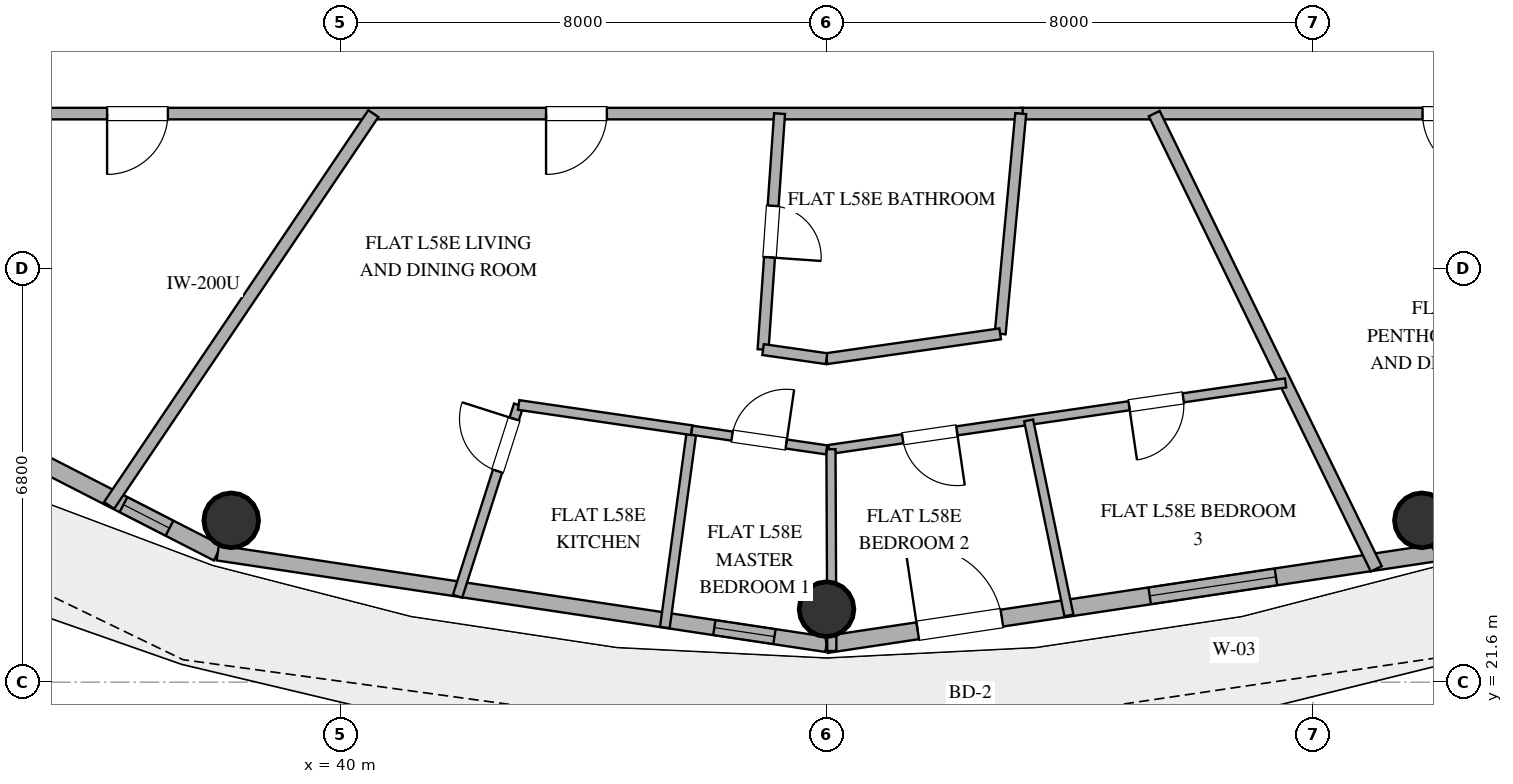
"""IFC4 building model, lengths in metres.
Left out: names, types, materials, properties, quantities, classifications, styles, units other than length and angle.
Written with IfcOpenShell. Run it as: python <this file> out.ifc"""

import sys

from ifc_helpers import new_model, si_unit, direction, frame, frame_2d, origin, origin_2d, place, context, subcontext, project, spatial, rectangle, hollow_circle, extrude, element, fill, save


model = new_model("IFC4")
c1 = context("Model", 3, precision=1e-05, world=origin(), true_north=direction((0.0, 1.0)))
c2 = subcontext(c1, "Body", "Model", "MODEL_VIEW")
j1 = project(units=[si_unit("LENGTHUNIT", "METRE"), si_unit("PLANEANGLEUNIT", "RADIAN")], contexts=[c1])
p1 = place(None, origin())
s1 = spatial("IfcSite", under=j1, at=p1, CompositionType="ELEMENT")
p2 = place(p1, origin())
s2 = spatial("IfcBuilding", under=s1, at=p2, CompositionType="ELEMENT")
p3 = place(p2, frame((0.0, 0.0, 228.0)))
s3 = spatial("IfcBuildingStorey", under=s2, at=p3, CompositionType="ELEMENT", Elevation=228.0)
for number, where, z_axis, x_axis in (
    (1, (38.209, 24.261, 0.0), (0.0, 0.0, 1.0), (1.0, 0.0, 0.0)),
    (2, (48.0, 22.8, 0.0), (0.0, 0.0, 1.0), (1.0, 0.0, 0.0)),
    (3, (57.791, 24.261, 0.0), (0.0, 0.0, 1.0), (1.0, 0.0, 0.0)),
):
    element("IfcColumn", number, at=place(p3, frame(where, z_axis=z_axis, x_axis=x_axis)), inside=s3, PredefinedType="COLUMN", context=c2, shape_type="SweptSolid", body=[
        extrude(hollow_circle(Radius=0.45, WallThickness=0.025, at=origin_2d()), origin(), (0.0, 0.0, 1.0), 3.36),
    ])
p4 = place(p3, frame((29.617, 28.013, 0.0), z_axis=(0.0, 0.0, 1.0), x_axis=(0.890007394051, -0.455946091699, 0.0)))
e4 = element("IfcWall", 4, at=p4, inside=s3, PredefinedType="SOLIDWALL", context=c2, shape_type="SweptSolid", body=[
    extrude(rectangle(XDim=9.404, YDim=0.28, at=frame_2d((4.702, 0.0))), origin(), (0.0, 0.0, 1.0), 3.36),
])
p5 = place(p4, frame((2.553, 0.0, 0.85)))
e5 = element("IfcOpeningElement", 5, at=p5, cuts=e4, PredefinedType="OPENING", context=c2, shape_type="SweptSolid", body=[
    extrude(rectangle(XDim=1.35, YDim=1.8, at=frame_2d((0.675, 0.9))), frame((0.0, 0.15, 0.0), z_axis=(0.0, -1.0, 0.0), x_axis=(1.0, 0.0, 0.0)), (0.0, 0.0, 1.0), 0.3),
])
p6 = place(p4, frame((4.88, 0.0, 0.85)))
e6 = element("IfcOpeningElement", 6, at=p6, cuts=e4, PredefinedType="OPENING", context=c2, shape_type="SweptSolid", body=[
    extrude(rectangle(XDim=1.35, YDim=1.8, at=frame_2d((0.675, 0.9))), frame((0.0, 0.15, 0.0), z_axis=(0.0, -1.0, 0.0), x_axis=(1.0, 0.0, 0.0)), (0.0, 0.0, 1.0), 0.3),
])
p7 = place(p4, frame((7.663, 0.0, 0.85)))
e7 = element("IfcOpeningElement", 7, at=p7, cuts=e4, PredefinedType="OPENING", context=c2, shape_type="SweptSolid", body=[
    extrude(rectangle(XDim=0.85, YDim=1.8, at=frame_2d((0.425, 0.9))), frame((0.0, 0.15, 0.0), z_axis=(0.0, -1.0, 0.0), x_axis=(1.0, 0.0, 0.0)), (0.0, 0.0, 1.0), 0.3),
])
p8 = place(p3, frame((37.987, 23.726, 0.0), z_axis=(0.0, 0.0, 1.0), x_axis=(0.988882522213, -0.148698881169, 0.0)))
e8 = element("IfcWall", 8, at=p8, inside=s3, PredefinedType="SOLIDWALL", context=c2, shape_type="SweptSolid", body=[
    extrude(rectangle(XDim=10.125, YDim=0.25, at=frame_2d((5.062, 0.0))), origin(), (0.0, 0.0, 1.0), 3.36),
])
p9 = place(p8, frame((8.259, 0.0, 0.35)))
e9 = element("IfcOpeningElement", 9, at=p9, cuts=e8, PredefinedType="OPENING", context=c2, shape_type="SweptSolid", body=[
    extrude(rectangle(XDim=1.0, YDim=1.05, at=frame_2d((0.5, 0.525))), frame((0.0, 0.135, 0.0), z_axis=(0.0, -1.0, 0.0), x_axis=(1.0, 0.0, 0.0)), (0.0, 0.0, 1.0), 0.27),
])
p10 = place(p3, frame((48.0, 22.22, 0.0), z_axis=(0.0, 0.0, 1.0), x_axis=(0.988882522213, 0.148698881169, 0.0)))
e10 = element("IfcWall", 10, at=p10, inside=s3, PredefinedType="SOLIDWALL", context=c2, shape_type="SweptSolid", body=[
    extrude(rectangle(XDim=10.125, YDim=0.28, at=frame_2d((5.062, 0.0))), origin(), (0.0, 0.0, 1.0), 3.36),
])
p11 = place(p10, frame((1.516, 0.0, 0.0)))
e11 = element("IfcOpeningElement", 11, at=p11, cuts=e10, PredefinedType="OPENING", context=c2, shape_type="SweptSolid", body=[
    extrude(rectangle(XDim=1.4, YDim=2.2, at=frame_2d((0.7, 1.1))), frame((0.0, 0.15, 0.0), z_axis=(0.0, -1.0, 0.0), x_axis=(1.0, 0.0, 0.0)), (0.0, 0.0, 1.0), 0.3),
])
p12 = place(p10, frame((5.374, 0.0, 0.85)))
e12 = element("IfcOpeningElement", 12, at=p12, cuts=e10, PredefinedType="OPENING", context=c2, shape_type="SweptSolid", body=[
    extrude(rectangle(XDim=2.1, YDim=2.2, at=frame_2d((1.05, 1.1))), frame((0.0, 0.15, 0.0), z_axis=(0.0, -1.0, 0.0), x_axis=(1.0, 0.0, 0.0)), (0.0, 0.0, 1.0), 0.3),
])
p13 = place(p3, frame((63.25, 30.95, 0.0), z_axis=(0.0, 0.0, 1.0), x_axis=(-1.0, 0.0, 0.0)))
e13 = element("IfcWall", 13, at=p13, inside=s3, PredefinedType="PARTITIONING", context=c2, shape_type="SweptSolid", body=[
    extrude(rectangle(XDim=12.056, YDim=0.19, at=frame_2d((6.028, 0.0))), origin(), (0.0, 0.0, 1.0), 2.72),
])
p14 = place(p13, frame((4.448, 0.0, 0.0)))
e14 = element("IfcOpeningElement", 14, at=p14, cuts=e13, PredefinedType="OPENING", context=c2, shape_type="SweptSolid", body=[
    extrude(rectangle(XDim=1.0, YDim=2.2, at=frame_2d((0.5, 1.1))), frame((0.0, 0.105, 0.0), z_axis=(0.0, -1.0, 0.0), x_axis=(1.0, 0.0, 0.0)), (0.0, 0.0, 1.0), 0.21),
])
p15 = place(p3, frame((51.226, 30.95, 0.0), z_axis=(0.0, 0.0, 1.0), x_axis=(-1.0, 0.0, 0.0)))
e15 = element("IfcWall", 15, at=p15, inside=s3, PredefinedType="PARTITIONING", context=c2, shape_type="SweptSolid", body=[
    extrude(rectangle(XDim=18.476, YDim=0.19, at=frame_2d((9.238, 0.0))), origin(), (0.0, 0.0, 1.0), 2.72),
])
p16 = place(p15, frame((14.058, 0.0, 0.0)))
e16 = element("IfcOpeningElement", 16, at=p16, cuts=e15, PredefinedType="OPENING", context=c2, shape_type="SweptSolid", body=[
    extrude(rectangle(XDim=1.0, YDim=2.2, at=frame_2d((0.5, 1.1))), frame((0.0, 0.105, 0.0), z_axis=(0.0, -1.0, 0.0), x_axis=(1.0, 0.0, 0.0)), (0.0, 0.0, 1.0), 0.21),
])
p17 = place(p15, frame((6.839, 0.0, 0.0)))
e17 = element("IfcOpeningElement", 17, at=p17, cuts=e15, PredefinedType="OPENING", context=c2, shape_type="SweptSolid", body=[
    extrude(rectangle(XDim=1.0, YDim=2.2, at=frame_2d((0.5, 1.1))), frame((0.0, 0.105, 0.0), z_axis=(0.0, -1.0, 0.0), x_axis=(1.0, 0.0, 0.0)), (0.0, 0.0, 1.0), 0.21),
])
p18 = place(p3, frame((36.201, 24.507, 0.0), z_axis=(0.0, 0.0, 1.0), x_axis=(0.559208454265, 0.8290270832, 0.0)))
e18 = element("IfcWall", 18, at=p18, inside=s3, PredefinedType="PARTITIONING", context=c2, shape_type="SweptSolid", body=[
    extrude(rectangle(XDim=7.771, YDim=0.2, at=frame_2d((3.886, 0.0))), origin(), (0.0, 0.0, 1.0), 2.72),
])
p19 = place(p3, frame((53.389, 30.95, 0.0), z_axis=(0.0, 0.0, 1.0), x_axis=(0.438386671508, -0.898786474222, 0.0)))
e19 = element("IfcWall", 19, at=p19, inside=s3, PredefinedType="PARTITIONING", context=c2, shape_type="SweptSolid", body=[
    extrude(rectangle(XDim=8.329, YDim=0.2, at=frame_2d((4.165, 0.0))), origin(), (0.0, 0.0, 1.0), 2.72),
])
p20 = place(p3, frame((55.55, 26.521, 0.0), z_axis=(0.0, 0.0, 1.0), x_axis=(-0.989535469331, -0.144289829636, 0.0)))
e20 = element("IfcWall", 20, at=p20, inside=s3, PredefinedType="PARTITIONING", context=c2, shape_type="SweptSolid", body=[
    extrude(rectangle(XDim=7.589, YDim=0.15, at=frame_2d((3.794, 0.0))), origin(), (0.0, 0.0, 1.0), 2.72),
])
p21 = place(p20, frame((1.701, 0.0, 0.0)))
e21 = element("IfcOpeningElement", 21, at=p21, cuts=e20, PredefinedType="OPENING", context=c2, shape_type="SweptSolid", body=[
    extrude(rectangle(XDim=0.9, YDim=2.1, at=frame_2d((0.45, 1.05))), frame((0.0, 0.085, 0.0), z_axis=(0.0, -1.0, 0.0), x_axis=(1.0, 0.0, 0.0)), (0.0, 0.0, 1.0), 0.17),
])
p22 = place(p20, frame((5.464, 0.0, 0.0)))
e22 = element("IfcOpeningElement", 22, at=p22, cuts=e20, PredefinedType="OPENING", context=c2, shape_type="SweptSolid", body=[
    extrude(rectangle(XDim=0.9, YDim=2.1, at=frame_2d((0.45, 1.05))), frame((0.0, 0.085, 0.0), z_axis=(0.0, -1.0, 0.0), x_axis=(1.0, 0.0, 0.0)), (0.0, 0.0, 1.0), 0.17),
])
p23 = place(p3, frame((47.227, 30.95, 0.0), z_axis=(0.0, 0.0, 1.0), x_axis=(-0.0697885329, -0.997561807948, 0.0)))
e23 = element("IfcWall", 23, at=p23, inside=s3, PredefinedType="PLUMBINGWALL", context=c2, shape_type="SweptSolid", body=[
    extrude(rectangle(XDim=3.89, YDim=0.18, at=frame_2d((1.945, 0.0))), origin(), (0.0, 0.0, 1.0), 2.72),
])
p24 = place(p23, frame((1.52, 0.0, 0.0)))
e24 = element("IfcOpeningElement", 24, at=p24, cuts=e23, PredefinedType="OPENING", context=c2, shape_type="SweptSolid", body=[
    extrude(rectangle(XDim=0.85, YDim=2.1, at=frame_2d((0.425, 1.05))), frame((0.0, 0.1, 0.0), z_axis=(0.0, -1.0, 0.0), x_axis=(1.0, 0.0, 0.0)), (0.0, 0.0, 1.0), 0.2),
])
p25 = place(p3, frame((50.855, 27.329, 0.0), z_axis=(0.0, 0.0, 1.0), x_axis=(0.093035036072, 0.995662835534, 0.0)))
e25 = element("IfcWall", 25, at=p25, inside=s3, PredefinedType="PLUMBINGWALL", context=c2, shape_type="SweptSolid", body=[
    extrude(rectangle(XDim=3.637, YDim=0.18, at=frame_2d((1.819, 0.0))), origin(), (0.0, 0.0, 1.0), 2.72),
])
p26 = place(p3, frame((48.087, 22.113, 0.0), z_axis=(0.0, 0.0, 1.0), x_axis=(-0.004415292895, 0.999990252547, 0.0)))
e26 = element("IfcWall", 26, at=p26, inside=s3, PredefinedType="PARTITIONING", context=c2, shape_type="SweptSolid", body=[
    extrude(rectangle(XDim=3.318, YDim=0.15, at=frame_2d((1.659, 0.0))), origin(), (0.0, 0.0, 1.0), 2.72),
])
p27 = place(p3, frame((41.931, 23.013, 0.0), z_axis=(0.0, 0.0, 1.0), x_axis=(0.304448437733, 0.952528817812, 0.0)))
e27 = element("IfcWall", 27, at=p27, inside=s3, PredefinedType="PLUMBINGWALL", context=c2, shape_type="SweptSolid", body=[
    extrude(rectangle(XDim=3.302, YDim=0.16, at=frame_2d((1.651, 0.0))), origin(), (0.0, 0.0, 1.0), 2.72),
])
p28 = place(p27, frame((2.161, 0.0, 0.0)))
e28 = element("IfcOpeningElement", 28, at=p28, cuts=e27, PredefinedType="OPENING", context=c2, shape_type="SweptSolid", body=[
    extrude(rectangle(XDim=0.9, YDim=2.1, at=frame_2d((0.45, 1.05))), frame((0.0, 0.09, 0.0), z_axis=(0.0, -1.0, 0.0), x_axis=(1.0, 0.0, 0.0)), (0.0, 0.0, 1.0), 0.18),
])
p29 = place(p3, frame((45.341, 22.499, 0.0), z_axis=(0.0, 0.0, 1.0), x_axis=(0.135083263994, 0.990834250412, 0.0)))
e29 = element("IfcWall", 29, at=p29, inside=s3, PredefinedType="PLUMBINGWALL", context=c2, shape_type="SweptSolid", body=[
    extrude(rectangle(XDim=3.275, YDim=0.16, at=frame_2d((1.637, 0.0))), origin(), (0.0, 0.0, 1.0), 2.72),
])
p30 = place(p3, frame((51.324, 25.905, 0.0), z_axis=(0.0, 0.0, 1.0), x_axis=(0.202292458381, -0.979325156055, 0.0)))
e30 = element("IfcWall", 30, at=p30, inside=s3, PredefinedType="PARTITIONING", context=c2, shape_type="SweptSolid", body=[
    extrude(rectangle(XDim=3.274, YDim=0.15, at=frame_2d((1.637, 0.0))), origin(), (0.0, 0.0, 1.0), 2.72),
])
p31 = place(p3, frame((48.0, 26.92, 0.0), z_axis=(0.0, 0.0, 1.0), x_axis=(0.989910519943, 0.141693904265, 0.0)))
e31 = element("IfcWall", 31, at=p31, inside=s3, PredefinedType="PLUMBINGWALL", context=c2, shape_type="SweptSolid", body=[
    extrude(rectangle(XDim=2.884, YDim=0.18, at=frame_2d((1.442, 0.0))), origin(), (0.0, 0.0, 1.0), 2.72),
])
p32 = place(p3, frame((42.937, 26.158, 0.0), z_axis=(0.0, 0.0, 1.0), x_axis=(0.989548377589, -0.144201277427, 0.0)))
e32 = element("IfcWall", 32, at=p32, inside=s3, PredefinedType="PLUMBINGWALL", context=c2, shape_type="SweptSolid", body=[
    extrude(rectangle(XDim=2.876, YDim=0.16, at=frame_2d((1.438, 0.0))), origin(), (0.0, 0.0, 1.0), 2.72),
])
p33 = place(p3, frame((45.783, 25.743, 0.0), z_axis=(0.0, 0.0, 1.0), x_axis=(0.989520009013, -0.144395816293, 0.0)))
e33 = element("IfcWall", 33, at=p33, inside=s3, PredefinedType="PARTITIONING", context=c2, shape_type="SweptSolid", body=[
    extrude(rectangle(XDim=2.24, YDim=0.15, at=frame_2d((1.12, 0.0))), origin(), (0.0, 0.0, 1.0), 2.72),
])
p34 = place(p33, frame((0.67, 0.0, 0.0)))
e34 = element("IfcOpeningElement", 34, at=p34, cuts=e33, PredefinedType="OPENING", context=c2, shape_type="SweptSolid", body=[
    extrude(rectangle(XDim=0.9, YDim=2.1, at=frame_2d((0.45, 1.05))), frame((0.0, 0.085, 0.0), z_axis=(0.0, -1.0, 0.0), x_axis=(1.0, 0.0, 0.0)), (0.0, 0.0, 1.0), 0.17),
])
p35 = place(p3, frame((46.956, 27.069, 0.0), z_axis=(0.0, 0.0, 1.0), x_axis=(0.989917064499, -0.141648174766, 0.0)))
e35 = element("IfcWall", 35, at=p35, inside=s3, PredefinedType="PLUMBINGWALL", context=c2, shape_type="SweptSolid", body=[
    extrude(rectangle(XDim=1.055, YDim=0.18, at=frame_2d((0.527, 0.0))), origin(), (0.0, 0.0, 1.0), 2.72),
])
p36 = place(p11, origin())
e36 = element("IfcDoor", 36, at=p36, inside=s3, OperationType="SINGLE_SWING_LEFT", PredefinedType="DOOR", context=c2, shape_type="SweptSolid", body=[
    extrude(rectangle(XDim=1.4, YDim=2.2, at=frame_2d((0.7, 1.1))), frame((0.0, 0.025, 0.0), z_axis=(0.0, -1.0, 0.0), x_axis=(1.0, 0.0, 0.0)), (0.0, 0.0, 1.0), 0.05),
])
fill(e11, e36)
p37 = place(p12, origin())
e37 = element("IfcWindow", 37, at=p37, inside=s3, PartitioningType="SINGLE_PANEL", PredefinedType="WINDOW", context=c2, shape_type="SweptSolid", body=[
    extrude(rectangle(XDim=2.1, YDim=2.2, at=frame_2d((1.05, 1.1))), frame((0.0, 0.03, 0.0), z_axis=(0.0, -1.0, 0.0), x_axis=(1.0, 0.0, 0.0)), (0.0, 0.0, 1.0), 0.06),
])
fill(e12, e37)
p38 = place(p7, origin())
e38 = element("IfcWindow", 38, at=p38, inside=s3, PartitioningType="SINGLE_PANEL", PredefinedType="WINDOW", context=c2, shape_type="SweptSolid", body=[
    extrude(rectangle(XDim=0.85, YDim=1.8, at=frame_2d((0.425, 0.9))), frame((0.0, 0.03, 0.0), z_axis=(0.0, -1.0, 0.0), x_axis=(1.0, 0.0, 0.0)), (0.0, 0.0, 1.0), 0.06),
])
fill(e7, e38)
p39 = place(p9, origin())
e39 = element("IfcWindow", 39, at=p39, inside=s3, PartitioningType="SINGLE_PANEL", PredefinedType="WINDOW", context=c2, shape_type="SweptSolid", body=[
    extrude(rectangle(XDim=1.0, YDim=1.05, at=frame_2d((0.5, 0.525))), frame((0.0, 0.03, 0.0), z_axis=(0.0, -1.0, 0.0), x_axis=(1.0, 0.0, 0.0)), (0.0, 0.0, 1.0), 0.06),
])
fill(e9, e39)
p40 = place(p14, origin())
e40 = element("IfcDoor", 40, at=p40, inside=s3, OperationType="SINGLE_SWING_LEFT", PredefinedType="DOOR", context=c2, shape_type="SweptSolid", body=[
    extrude(rectangle(XDim=1.0, YDim=2.2, at=frame_2d((0.5, 1.1))), frame((0.0, 0.025, 0.0), z_axis=(0.0, -1.0, 0.0), x_axis=(1.0, 0.0, 0.0)), (0.0, 0.0, 1.0), 0.05),
])
fill(e14, e40)
p41 = place(p16, origin())
e41 = element("IfcDoor", 41, at=p41, inside=s3, OperationType="SINGLE_SWING_RIGHT", PredefinedType="DOOR", context=c2, shape_type="SweptSolid", body=[
    extrude(rectangle(XDim=1.0, YDim=2.2, at=frame_2d((0.5, 1.1))), frame((0.0, 0.025, 0.0), z_axis=(0.0, -1.0, 0.0), x_axis=(1.0, 0.0, 0.0)), (0.0, 0.0, 1.0), 0.05),
])
fill(e16, e41)
p42 = place(p17, origin())
e42 = element("IfcDoor", 42, at=p42, inside=s3, OperationType="SINGLE_SWING_RIGHT", PredefinedType="DOOR", context=c2, shape_type="SweptSolid", body=[
    extrude(rectangle(XDim=1.0, YDim=2.2, at=frame_2d((0.5, 1.1))), frame((0.0, 0.025, 0.0), z_axis=(0.0, -1.0, 0.0), x_axis=(1.0, 0.0, 0.0)), (0.0, 0.0, 1.0), 0.05),
])
fill(e17, e42)
p43 = place(p21, origin())
e43 = element("IfcDoor", 43, at=p43, inside=s3, OperationType="SINGLE_SWING_RIGHT", PredefinedType="DOOR", context=c2, shape_type="SweptSolid", body=[
    extrude(rectangle(XDim=0.9, YDim=2.1, at=frame_2d((0.45, 1.05))), frame((0.0, 0.025, 0.0), z_axis=(0.0, -1.0, 0.0), x_axis=(1.0, 0.0, 0.0)), (0.0, 0.0, 1.0), 0.05),
])
fill(e21, e43)
p44 = place(p22, origin())
e44 = element("IfcDoor", 44, at=p44, inside=s3, OperationType="SINGLE_SWING_LEFT", PredefinedType="DOOR", context=c2, shape_type="SweptSolid", body=[
    extrude(rectangle(XDim=0.9, YDim=2.1, at=frame_2d((0.45, 1.05))), frame((0.0, 0.025, 0.0), z_axis=(0.0, -1.0, 0.0), x_axis=(1.0, 0.0, 0.0)), (0.0, 0.0, 1.0), 0.05),
])
fill(e22, e44)
p45 = place(p24, origin())
e45 = element("IfcDoor", 45, at=p45, inside=s3, OperationType="SINGLE_SWING_RIGHT", PredefinedType="DOOR", context=c2, shape_type="SweptSolid", body=[
    extrude(rectangle(XDim=0.85, YDim=2.1, at=frame_2d((0.425, 1.05))), frame((0.0, 0.025, 0.0), z_axis=(0.0, -1.0, 0.0), x_axis=(1.0, 0.0, 0.0)), (0.0, 0.0, 1.0), 0.05),
])
fill(e24, e45)
p46 = place(p28, origin())
e46 = element("IfcDoor", 46, at=p46, inside=s3, OperationType="SINGLE_SWING_RIGHT", PredefinedType="DOOR", context=c2, shape_type="SweptSolid", body=[
    extrude(rectangle(XDim=0.9, YDim=2.1, at=frame_2d((0.45, 1.05))), frame((0.0, 0.025, 0.0), z_axis=(0.0, -1.0, 0.0), x_axis=(1.0, 0.0, 0.0)), (0.0, 0.0, 1.0), 0.05),
])
fill(e28, e46)
p47 = place(p34, origin())
e47 = element("IfcDoor", 47, at=p47, inside=s3, OperationType="SINGLE_SWING_RIGHT", PredefinedType="DOOR", context=c2, shape_type="SweptSolid", body=[
    extrude(rectangle(XDim=0.9, YDim=2.1, at=frame_2d((0.45, 1.05))), frame((0.0, 0.025, 0.0), z_axis=(0.0, -1.0, 0.0), x_axis=(1.0, 0.0, 0.0)), (0.0, 0.0, 1.0), 0.05),
])
fill(e34, e47)
save(model, sys.argv[1])
